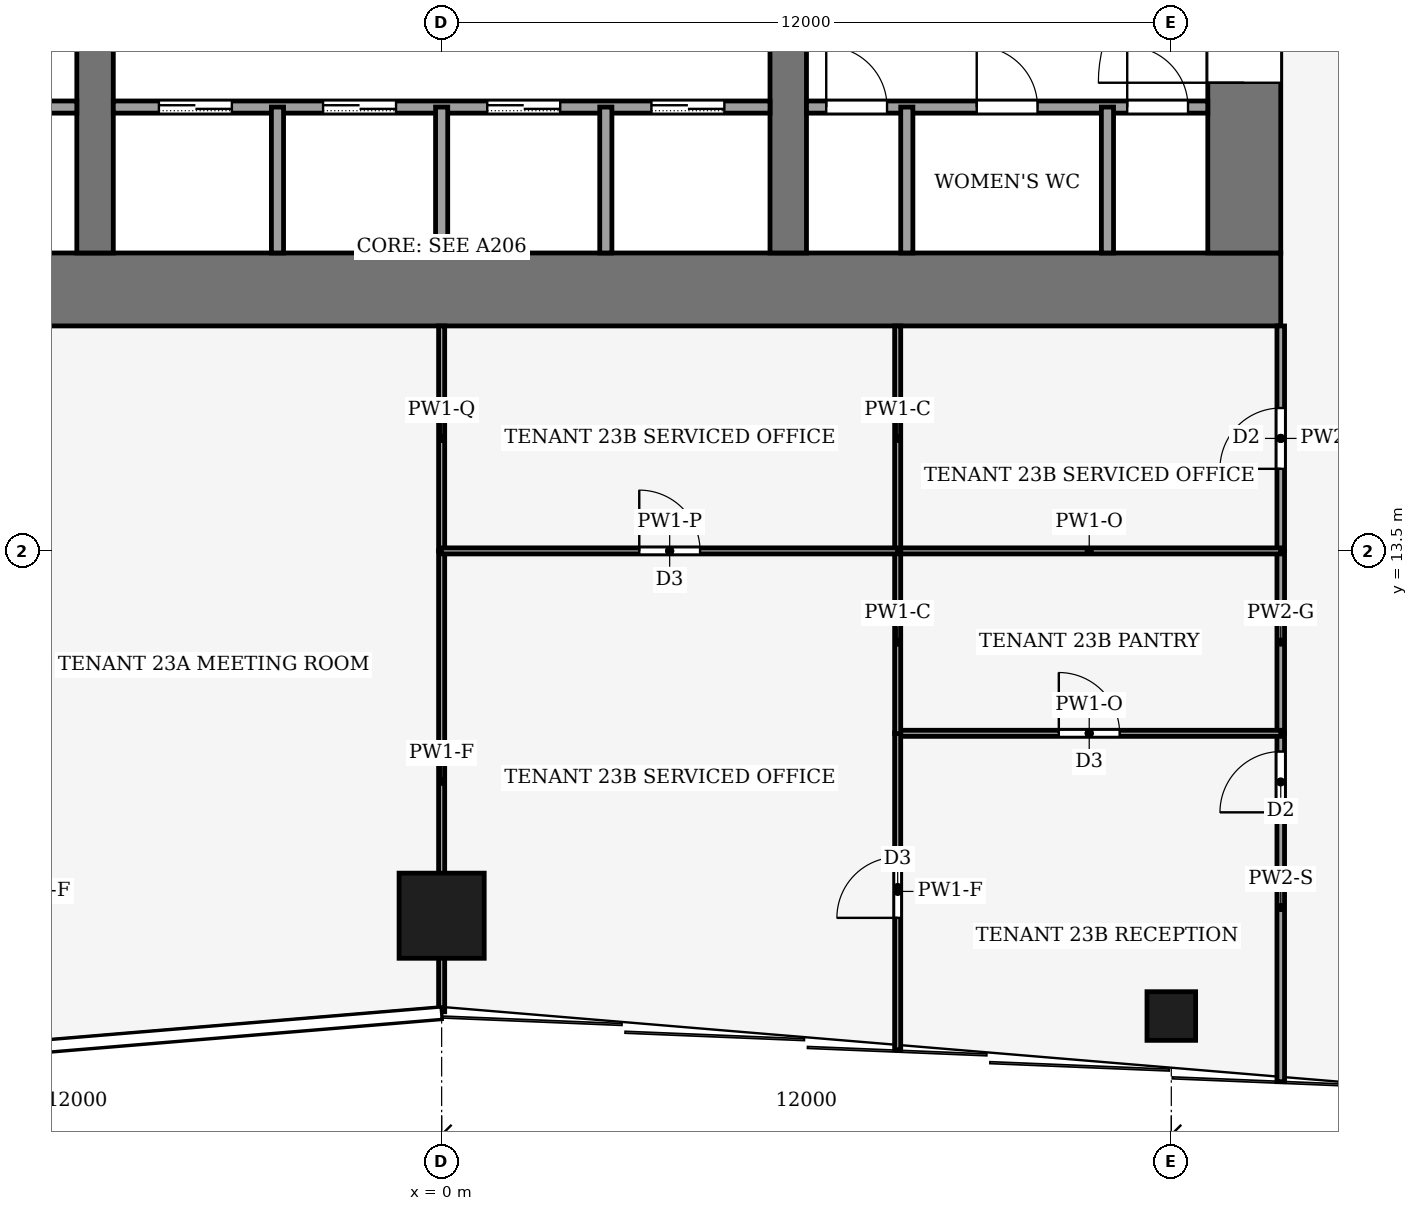
"""IFC4 building model, lengths in metres.
Left out: names, types, materials, properties, quantities, classifications, styles, units other than length and angle.
Written with IfcOpenShell. Run it as: python <this file> out.ifc"""

import sys

from ifc_helpers import new_model, si_unit, direction, frame, frame_2d, origin, origin_2d, place, context, subcontext, project, spatial, rectangle, hollow_rectangle, extrude, element, fill, save


model = new_model("IFC4")
c1 = context("Model", 3, precision=1e-05, world=origin(), true_north=direction((0.0, 1.0)))
c2 = subcontext(c1, "Body", "Model", "MODEL_VIEW")
j1 = project(units=[si_unit("LENGTHUNIT", "METRE"), si_unit("PLANEANGLEUNIT", "RADIAN")], contexts=[c1])
p1 = place(None, origin())
s1 = spatial("IfcSite", under=j1, at=p1, CompositionType="ELEMENT")
p2 = place(p1, origin())
s2 = spatial("IfcBuilding", under=s1, at=p2, CompositionType="ELEMENT")
p3 = place(p2, frame((0.0, 0.0, 102.0)))
s3 = spatial("IfcBuildingStorey", under=s2, at=p3, CompositionType="ELEMENT", Elevation=102.0)
p4 = place(p3, frame((-13.8, 17.8, -0.13), z_axis=(0.0, 0.0, 1.0), x_axis=(1.0, 0.0, 0.0)))
e1 = element("IfcWall", 1, at=p4, inside=s3, PredefinedType="SHEAR", context=c2, shape_type="SweptSolid", body=[
    extrude(rectangle(XDim=27.6, YDim=1.2, at=frame_2d((13.8, 0.0))), origin(), (0.0, 0.0, 1.0), 4.0),
])
p5 = place(p3, frame((13.2, 18.4, -0.13), z_axis=(0.0, 0.0, 1.0), x_axis=(0.0, 1.0, 0.0)))
e2 = element("IfcWall", 2, at=p5, inside=s3, PredefinedType="SHEAR", context=c2, shape_type="SweptSolid", body=[
    extrude(rectangle(XDim=19.2, YDim=1.2, at=frame_2d((9.6, 0.0))), origin(), (0.0, 0.0, 1.0), 4.0),
])
p6 = place(p5, frame((2.8, 0.0, 0.13)))
e3 = element("IfcOpeningElement", 3, at=p6, cuts=e2, PredefinedType="OPENING", context=c2, shape_type="SweptSolid", body=[
    extrude(rectangle(XDim=2.4, YDim=2.4, at=frame_2d((1.2, 1.2))), frame((0.0, 0.61, 0.0), z_axis=(0.0, -1.0, 0.0), x_axis=(1.0, 0.0, 0.0)), (0.0, 0.0, 1.0), 1.22),
])
p7 = place(p5, frame((13.3, 0.0, 0.13)))
e4 = element("IfcOpeningElement", 4, at=p7, cuts=e2, PredefinedType="OPENING", context=c2, shape_type="SweptSolid", body=[
    extrude(rectangle(XDim=2.4, YDim=2.4, at=frame_2d((1.2, 1.2))), frame((0.0, 0.61, 0.0), z_axis=(0.0, -1.0, 0.0), x_axis=(1.0, 0.0, 0.0)), (0.0, 0.0, 1.0), 1.22),
])
p8 = place(p3, frame((-5.7, 18.4, -0.13), z_axis=(0.0, 0.0, 1.0), x_axis=(0.0, 1.0, 0.0)))
e5 = element("IfcWall", 5, at=p8, inside=s3, PredefinedType="SHEAR", context=c2, shape_type="SweptSolid", body=[
    extrude(rectangle(XDim=19.2, YDim=0.6, at=frame_2d((9.6, 0.0))), origin(), (0.0, 0.0, 1.0), 4.0),
])
p9 = place(p8, frame((8.35, 0.0, 0.13)))
e6 = element("IfcOpeningElement", 6, at=p9, cuts=e5, PredefinedType="OPENING", context=c2, shape_type="SweptSolid", body=[
    extrude(rectangle(XDim=0.9, YDim=2.1, at=frame_2d((0.45, 1.05))), frame((0.0, 0.31, 0.0), z_axis=(0.0, -1.0, 0.0), x_axis=(1.0, 0.0, 0.0)), (0.0, 0.0, 1.0), 0.62),
])
p10 = place(p3, frame((5.7, 18.4, -0.13), z_axis=(0.0, 0.0, 1.0), x_axis=(0.0, 1.0, 0.0)))
e7 = element("IfcWall", 7, at=p10, inside=s3, PredefinedType="SHEAR", context=c2, shape_type="SweptSolid", body=[
    extrude(rectangle(XDim=19.2, YDim=0.6, at=frame_2d((9.6, 0.0))), origin(), (0.0, 0.0, 1.0), 4.0),
])
p11 = place(p10, frame((13.3, 0.0, 0.13)))
e8 = element("IfcOpeningElement", 8, at=p11, cuts=e7, PredefinedType="OPENING", context=c2, shape_type="SweptSolid", body=[
    extrude(rectangle(XDim=2.4, YDim=2.4, at=frame_2d((1.2, 1.2))), frame((0.0, 0.31, 0.0), z_axis=(0.0, -1.0, 0.0), x_axis=(1.0, 0.0, 0.0)), (0.0, 0.0, 1.0), 0.62),
])
p12 = place(p3, frame((0.0, 7.5, 0.0), z_axis=(0.0, 0.0, 1.0), x_axis=(1.0, 0.0, 0.0)))
e9 = element("IfcColumn", 9, at=p12, inside=s3, PredefinedType="COLUMN", context=c2, shape_type="SweptSolid", body=[
    extrude(hollow_rectangle(XDim=1.4, YDim=1.4, WallThickness=0.08, at=origin_2d()), origin(), (0.0, 0.0, 1.0), 4.0),
])
p13 = place(p3, frame((12.0, 5.85, 0.0), z_axis=(0.0, 0.0, 1.0), x_axis=(1.0, 0.0, 0.0)))
e10 = element("IfcColumn", 10, at=p13, inside=s3, PredefinedType="COLUMN", context=c2, shape_type="SweptSolid", body=[
    extrude(hollow_rectangle(XDim=0.8, YDim=0.8, WallThickness=0.04, at=origin_2d()), origin(), (0.0, 0.0, 1.0), 4.0),
])
p14 = place(p3, frame((-12.6, 20.8, 0.0), z_axis=(0.0, 0.0, 1.0), x_axis=(1.0, 0.0, 0.0)))
e11 = element("IfcWall", 11, at=p14, inside=s3, PredefinedType="PARTITIONING", context=c2, shape_type="SweptSolid", body=[
    extrude(rectangle(XDim=6.6, YDim=0.2, at=frame_2d((3.3, 0.0))), origin(), (0.0, 0.0, 1.0), 3.87),
])
p15 = place(p14, frame((2.8, 0.0, 0.0)))
e12 = element("IfcOpeningElement", 12, at=p15, cuts=e11, PredefinedType="OPENING", context=c2, shape_type="SweptSolid", body=[
    extrude(rectangle(XDim=1.0, YDim=2.1, at=frame_2d((0.5, 1.05))), frame((0.0, 0.11, 0.0), z_axis=(0.0, -1.0, 0.0), x_axis=(1.0, 0.0, 0.0)), (0.0, 0.0, 1.0), 0.22),
])
p16 = place(p3, frame((-5.4, 20.8, 0.0), z_axis=(0.0, 0.0, 1.0), x_axis=(1.0, 0.0, 0.0)))
e13 = element("IfcWall", 13, at=p16, inside=s3, PredefinedType="PARTITIONING", context=c2, shape_type="SweptSolid", body=[
    extrude(rectangle(XDim=10.8, YDim=0.2, at=frame_2d((5.4, 0.0))), origin(), (0.0, 0.0, 1.0), 3.87),
])
p17 = place(p16, frame((0.75, 0.0, 0.0)))
e14 = element("IfcOpeningElement", 14, at=p17, cuts=e13, PredefinedType="OPENING", context=c2, shape_type="SweptSolid", body=[
    extrude(rectangle(XDim=1.2, YDim=2.2, at=frame_2d((0.6, 1.1))), frame((0.0, 0.11, 0.0), z_axis=(0.0, -1.0, 0.0), x_axis=(1.0, 0.0, 0.0)), (0.0, 0.0, 1.0), 0.22),
])
p18 = place(p16, frame((3.45, 0.0, 0.0)))
e15 = element("IfcOpeningElement", 15, at=p18, cuts=e13, PredefinedType="OPENING", context=c2, shape_type="SweptSolid", body=[
    extrude(rectangle(XDim=1.2, YDim=2.2, at=frame_2d((0.6, 1.1))), frame((0.0, 0.11, 0.0), z_axis=(0.0, -1.0, 0.0), x_axis=(1.0, 0.0, 0.0)), (0.0, 0.0, 1.0), 0.22),
])
p19 = place(p16, frame((6.15, 0.0, 0.0)))
e16 = element("IfcOpeningElement", 16, at=p19, cuts=e13, PredefinedType="OPENING", context=c2, shape_type="SweptSolid", body=[
    extrude(rectangle(XDim=1.2, YDim=2.2, at=frame_2d((0.6, 1.1))), frame((0.0, 0.11, 0.0), z_axis=(0.0, -1.0, 0.0), x_axis=(1.0, 0.0, 0.0)), (0.0, 0.0, 1.0), 0.22),
])
p20 = place(p16, frame((8.85, 0.0, 0.0)))
e17 = element("IfcOpeningElement", 17, at=p20, cuts=e13, PredefinedType="OPENING", context=c2, shape_type="SweptSolid", body=[
    extrude(rectangle(XDim=1.2, YDim=2.2, at=frame_2d((0.6, 1.1))), frame((0.0, 0.11, 0.0), z_axis=(0.0, -1.0, 0.0), x_axis=(1.0, 0.0, 0.0)), (0.0, 0.0, 1.0), 0.22),
])
p21 = place(p3, frame((6.0, 20.8, 0.0), z_axis=(0.0, 0.0, 1.0), x_axis=(1.0, 0.0, 0.0)))
e18 = element("IfcWall", 18, at=p21, inside=s3, PredefinedType="PARTITIONING", context=c2, shape_type="SweptSolid", body=[
    extrude(rectangle(XDim=6.6, YDim=0.2, at=frame_2d((3.3, 0.0))), origin(), (0.0, 0.0, 1.0), 3.87),
])
p22 = place(p21, frame((0.325, 0.0, 0.0)))
e19 = element("IfcOpeningElement", 19, at=p22, cuts=e18, PredefinedType="OPENING", context=c2, shape_type="SweptSolid", body=[
    extrude(rectangle(XDim=1.0, YDim=2.1, at=frame_2d((0.5, 1.05))), frame((0.0, 0.11, 0.0), z_axis=(0.0, -1.0, 0.0), x_axis=(1.0, 0.0, 0.0)), (0.0, 0.0, 1.0), 0.22),
])
p23 = place(p21, frame((2.8, 0.0, 0.0)))
e20 = element("IfcOpeningElement", 20, at=p23, cuts=e18, PredefinedType="OPENING", context=c2, shape_type="SweptSolid", body=[
    extrude(rectangle(XDim=1.0, YDim=2.1, at=frame_2d((0.5, 1.05))), frame((0.0, 0.11, 0.0), z_axis=(0.0, -1.0, 0.0), x_axis=(1.0, 0.0, 0.0)), (0.0, 0.0, 1.0), 0.22),
])
p24 = place(p21, frame((5.275, 0.0, 0.0)))
e21 = element("IfcOpeningElement", 21, at=p24, cuts=e18, PredefinedType="OPENING", context=c2, shape_type="SweptSolid", body=[
    extrude(rectangle(XDim=1.0, YDim=2.1, at=frame_2d((0.5, 1.05))), frame((0.0, 0.11, 0.0), z_axis=(0.0, -1.0, 0.0), x_axis=(1.0, 0.0, 0.0)), (0.0, 0.0, 1.0), 0.22),
])
for number, where, z_axis, x_axis in (
    (22, (-2.7, 18.4, 0.0), (0.0, 0.0, 1.0), (0.0, 1.0, 0.0)),
    (23, (0.0, 18.4, 0.0), (0.0, 0.0, 1.0), (0.0, 1.0, 0.0)),
    (24, (2.7, 18.4, 0.0), (0.0, 0.0, 1.0), (0.0, 1.0, 0.0)),
    (25, (7.65, 18.4, 0.0), (0.0, 0.0, 1.0), (0.0, 1.0, 0.0)),
    (26, (10.95, 18.4, 0.0), (0.0, 0.0, 1.0), (0.0, 1.0, 0.0)),
):
    element("IfcWall", number, at=place(p3, frame(where, z_axis=z_axis, x_axis=x_axis)), inside=s3, PredefinedType="PARTITIONING", context=c2, shape_type="SweptSolid", body=[
        extrude(rectangle(XDim=2.4, YDim=0.2, at=frame_2d((1.2, 0.0))), origin(), (0.0, 0.0, 1.0), 3.87),
    ])
p25 = place(p3, frame((13.8, 4.77, 0.0), z_axis=(0.0, 0.0, 1.0), x_axis=(0.0, 1.0, 0.0)))
e27 = element("IfcWall", 27, at=p25, inside=s3, PredefinedType="PARTITIONING", context=c2, shape_type="SweptSolid", body=[
    extrude(rectangle(XDim=5.73, YDim=0.125, at=frame_2d((2.865, 0.0))), origin(), (0.0, 0.0, 1.0), 3.04),
])
p26 = place(p25, frame((4.43, 0.0, 0.0)))
e28 = element("IfcOpeningElement", 28, at=p26, cuts=e27, PredefinedType="OPENING", context=c2, shape_type="SweptSolid", body=[
    extrude(rectangle(XDim=1.0, YDim=2.1, at=frame_2d((0.5, 1.05))), frame((0.0, 0.073, 0.0), z_axis=(0.0, -1.0, 0.0), x_axis=(1.0, 0.0, 0.0)), (0.0, 0.0, 1.0), 0.145),
])
p27 = place(p3, frame((13.8, 13.5, 0.0), z_axis=(0.0, 0.0, 1.0), x_axis=(0.0, -1.0, 0.0)))
e29 = element("IfcWall", 29, at=p27, inside=s3, PredefinedType="PARTITIONING", context=c2, shape_type="SweptSolid", body=[
    extrude(rectangle(XDim=3.0, YDim=0.125, at=frame_2d((1.5, 0.0))), origin(), (0.0, 0.0, 1.0), 3.87),
])
p28 = place(p3, frame((13.8, 13.5, 0.0), z_axis=(0.0, 0.0, 1.0), x_axis=(0.0, 1.0, 0.0)))
e30 = element("IfcWall", 30, at=p28, inside=s3, PredefinedType="PARTITIONING", context=c2, shape_type="SweptSolid", body=[
    extrude(rectangle(XDim=3.7, YDim=0.125, at=frame_2d((1.85, 0.0))), origin(), (0.0, 0.0, 1.0), 3.14),
])
p29 = place(p28, frame((1.35, 0.0, 0.0)))
e31 = element("IfcOpeningElement", 31, at=p29, cuts=e30, PredefinedType="OPENING", context=c2, shape_type="SweptSolid", body=[
    extrude(rectangle(XDim=1.0, YDim=2.1, at=frame_2d((0.5, 1.05))), frame((0.0, 0.073, 0.0), z_axis=(0.0, -1.0, 0.0), x_axis=(1.0, 0.0, 0.0)), (0.0, 0.0, 1.0), 0.145),
])
p30 = place(p3, frame((0.0, 5.92, 0.0), z_axis=(0.0, 0.0, 1.0), x_axis=(0.0, 1.0, 0.0)))
e32 = element("IfcWall", 32, at=p30, inside=s3, PredefinedType="PARTITIONING", context=c2, shape_type="SweptSolid", body=[
    extrude(rectangle(XDim=7.58, YDim=0.1, at=frame_2d((3.79, 0.0))), origin(), (0.0, 0.0, 1.0), 3.04),
])
p31 = place(p3, frame((0.0, 13.5, 0.0), z_axis=(0.0, 0.0, 1.0), x_axis=(0.0, 1.0, 0.0)))
e33 = element("IfcWall", 33, at=p31, inside=s3, PredefinedType="PARTITIONING", context=c2, shape_type="SweptSolid", body=[
    extrude(rectangle(XDim=3.7, YDim=0.1, at=frame_2d((1.85, 0.0))), origin(), (0.0, 0.0, 1.0), 3.48),
])
p32 = place(p3, frame((7.5, 10.5, 0.0), z_axis=(0.0, 0.0, 1.0), x_axis=(1.0, 0.0, 0.0)))
e34 = element("IfcWall", 34, at=p32, inside=s3, PredefinedType="PARTITIONING", context=c2, shape_type="SweptSolid", body=[
    extrude(rectangle(XDim=6.3, YDim=0.1, at=frame_2d((3.15, 0.0))), origin(), (0.0, 0.0, 1.0), 3.39),
])
p33 = place(p32, frame((2.65, 0.0, 0.0)))
e35 = element("IfcOpeningElement", 35, at=p33, cuts=e34, PredefinedType="OPENING", context=c2, shape_type="SweptSolid", body=[
    extrude(rectangle(XDim=1.0, YDim=2.1, at=frame_2d((0.5, 1.05))), frame((0.0, 0.06, 0.0), z_axis=(0.0, -1.0, 0.0), x_axis=(1.0, 0.0, 0.0)), (0.0, 0.0, 1.0), 0.12),
])
p34 = place(p3, frame((7.5, 5.295, 0.0), z_axis=(0.0, 0.0, 1.0), x_axis=(0.0, 1.0, 0.0)))
e36 = element("IfcWall", 36, at=p34, inside=s3, PredefinedType="PARTITIONING", context=c2, shape_type="SweptSolid", body=[
    extrude(rectangle(XDim=5.209, YDim=0.1, at=frame_2d((2.604, 0.0))), origin(), (0.0, 0.0, 1.0), 3.04),
])
p35 = place(p34, frame((2.17, 0.0, 0.0)))
e37 = element("IfcOpeningElement", 37, at=p35, cuts=e36, PredefinedType="OPENING", context=c2, shape_type="SweptSolid", body=[
    extrude(rectangle(XDim=1.0, YDim=2.1, at=frame_2d((0.5, 1.05))), frame((0.0, 0.06, 0.0), z_axis=(0.0, -1.0, 0.0), x_axis=(1.0, 0.0, 0.0)), (0.0, 0.0, 1.0), 0.12),
])
p36 = place(p3, frame((13.8, 13.5, 0.0), z_axis=(0.0, 0.0, 1.0), x_axis=(-1.0, 0.0, 0.0)))
e38 = element("IfcWall", 38, at=p36, inside=s3, PredefinedType="PARTITIONING", context=c2, shape_type="SweptSolid", body=[
    extrude(rectangle(XDim=6.3, YDim=0.1, at=frame_2d((3.15, 0.0))), origin(), (0.0, 0.0, 1.0), 3.39),
])
p37 = place(p3, frame((7.5, 13.5, 0.0), z_axis=(0.0, 0.0, 1.0), x_axis=(0.0, -1.0, 0.0)))
e39 = element("IfcWall", 39, at=p37, inside=s3, PredefinedType="PARTITIONING", context=c2, shape_type="SweptSolid", body=[
    extrude(rectangle(XDim=3.004, YDim=0.1, at=frame_2d((1.502, 0.0))), origin(), (0.0, 0.0, 1.0), 3.87),
])
p38 = place(p3, frame((7.5, 17.2, 0.0), z_axis=(0.0, 0.0, 1.0), x_axis=(0.0, -1.0, 0.0)))
e40 = element("IfcWall", 40, at=p38, inside=s3, PredefinedType="PARTITIONING", context=c2, shape_type="SweptSolid", body=[
    extrude(rectangle(XDim=3.7, YDim=0.1, at=frame_2d((1.85, 0.0))), origin(), (0.0, 0.0, 1.0), 3.87),
])
p39 = place(p3, frame((0.0, 13.5, 0.0), z_axis=(0.0, 0.0, 1.0), x_axis=(1.0, 0.0, 0.0)))
e41 = element("IfcWall", 41, at=p39, inside=s3, PredefinedType="PARTITIONING", context=c2, shape_type="SweptSolid", body=[
    extrude(rectangle(XDim=7.5, YDim=0.1, at=frame_2d((3.75, 0.0))), origin(), (0.0, 0.0, 1.0), 3.44),
])
p40 = place(p39, frame((3.25, 0.0, 0.0)))
e42 = element("IfcOpeningElement", 42, at=p40, cuts=e41, PredefinedType="OPENING", context=c2, shape_type="SweptSolid", body=[
    extrude(rectangle(XDim=1.0, YDim=2.1, at=frame_2d((0.5, 1.05))), frame((0.0, 0.06, 0.0), z_axis=(0.0, -1.0, 0.0), x_axis=(1.0, 0.0, 0.0)), (0.0, 0.0, 1.0), 0.12),
])
p41 = place(p17, origin())
e43 = element("IfcDoor", 43, at=p41, inside=s3, OperationType="SLIDING_TO_LEFT", PredefinedType="DOOR", context=c2, shape_type="SweptSolid", body=[
    extrude(rectangle(XDim=1.2, YDim=2.2, at=frame_2d((0.6, 1.1))), frame((0.0, 0.025, 0.0), z_axis=(0.0, -1.0, 0.0), x_axis=(1.0, 0.0, 0.0)), (0.0, 0.0, 1.0), 0.05),
])
fill(e14, e43)
p42 = place(p18, origin())
e44 = element("IfcDoor", 44, at=p42, inside=s3, OperationType="SLIDING_TO_LEFT", PredefinedType="DOOR", context=c2, shape_type="SweptSolid", body=[
    extrude(rectangle(XDim=1.2, YDim=2.2, at=frame_2d((0.6, 1.1))), frame((0.0, 0.025, 0.0), z_axis=(0.0, -1.0, 0.0), x_axis=(1.0, 0.0, 0.0)), (0.0, 0.0, 1.0), 0.05),
])
fill(e15, e44)
p43 = place(p19, origin())
e45 = element("IfcDoor", 45, at=p43, inside=s3, OperationType="SLIDING_TO_LEFT", PredefinedType="DOOR", context=c2, shape_type="SweptSolid", body=[
    extrude(rectangle(XDim=1.2, YDim=2.2, at=frame_2d((0.6, 1.1))), frame((0.0, 0.025, 0.0), z_axis=(0.0, -1.0, 0.0), x_axis=(1.0, 0.0, 0.0)), (0.0, 0.0, 1.0), 0.05),
])
fill(e16, e45)
p44 = place(p20, origin())
e46 = element("IfcDoor", 46, at=p44, inside=s3, OperationType="SLIDING_TO_LEFT", PredefinedType="DOOR", context=c2, shape_type="SweptSolid", body=[
    extrude(rectangle(XDim=1.2, YDim=2.2, at=frame_2d((0.6, 1.1))), frame((0.0, 0.025, 0.0), z_axis=(0.0, -1.0, 0.0), x_axis=(1.0, 0.0, 0.0)), (0.0, 0.0, 1.0), 0.05),
])
fill(e17, e46)
p45 = place(p22, origin())
e47 = element("IfcDoor", 47, at=p45, inside=s3, OperationType="SINGLE_SWING_LEFT", PredefinedType="DOOR", context=c2, shape_type="SweptSolid", body=[
    extrude(rectangle(XDim=1.0, YDim=2.1, at=frame_2d((0.5, 1.05))), frame((0.0, 0.025, 0.0), z_axis=(0.0, -1.0, 0.0), x_axis=(1.0, 0.0, 0.0)), (0.0, 0.0, 1.0), 0.05),
])
fill(e19, e47)
p46 = place(p23, origin())
e48 = element("IfcDoor", 48, at=p46, inside=s3, OperationType="SINGLE_SWING_LEFT", PredefinedType="DOOR", context=c2, shape_type="SweptSolid", body=[
    extrude(rectangle(XDim=1.0, YDim=2.1, at=frame_2d((0.5, 1.05))), frame((0.0, 0.025, 0.0), z_axis=(0.0, -1.0, 0.0), x_axis=(1.0, 0.0, 0.0)), (0.0, 0.0, 1.0), 0.05),
])
fill(e20, e48)
p47 = place(p24, origin())
e49 = element("IfcDoor", 49, at=p47, inside=s3, OperationType="SINGLE_SWING_LEFT", PredefinedType="DOOR", context=c2, shape_type="SweptSolid", body=[
    extrude(rectangle(XDim=1.0, YDim=2.1, at=frame_2d((0.5, 1.05))), frame((0.0, 0.025, 0.0), z_axis=(0.0, -1.0, 0.0), x_axis=(1.0, 0.0, 0.0)), (0.0, 0.0, 1.0), 0.05),
])
fill(e21, e49)
p48 = place(p6, origin())
e50 = element("IfcDoor", 50, at=p48, inside=s3, OperationType="DOUBLE_DOOR_SINGLE_SWING", PredefinedType="DOOR", context=c2, shape_type="SweptSolid", body=[
    extrude(rectangle(XDim=2.4, YDim=2.4, at=frame_2d((1.2, 1.2))), frame((0.0, 0.025, 0.0), z_axis=(0.0, -1.0, 0.0), x_axis=(1.0, 0.0, 0.0)), (0.0, 0.0, 1.0), 0.05),
])
fill(e3, e50)
p49 = place(p26, origin())
e51 = element("IfcDoor", 51, at=p49, inside=s3, OperationType="SINGLE_SWING_RIGHT", PredefinedType="DOOR", context=c2, shape_type="SweptSolid", body=[
    extrude(rectangle(XDim=1.0, YDim=2.1, at=frame_2d((0.5, 1.05))), frame((0.0, 0.025, 0.0), z_axis=(0.0, -1.0, 0.0), x_axis=(1.0, 0.0, 0.0)), (0.0, 0.0, 1.0), 0.05),
])
fill(e28, e51)
p50 = place(p29, origin())
e52 = element("IfcDoor", 52, at=p50, inside=s3, OperationType="SINGLE_SWING_LEFT", PredefinedType="DOOR", context=c2, shape_type="SweptSolid", body=[
    extrude(rectangle(XDim=1.0, YDim=2.1, at=frame_2d((0.5, 1.05))), frame((0.0, 0.025, 0.0), z_axis=(0.0, -1.0, 0.0), x_axis=(1.0, 0.0, 0.0)), (0.0, 0.0, 1.0), 0.05),
])
fill(e31, e52)
p51 = place(p33, origin())
e53 = element("IfcDoor", 53, at=p51, inside=s3, OperationType="SINGLE_SWING_RIGHT", PredefinedType="DOOR", context=c2, shape_type="SweptSolid", body=[
    extrude(rectangle(XDim=1.0, YDim=2.1, at=frame_2d((0.5, 1.05))), frame((0.0, 0.025, 0.0), z_axis=(0.0, -1.0, 0.0), x_axis=(1.0, 0.0, 0.0)), (0.0, 0.0, 1.0), 0.05),
])
fill(e35, e53)
p52 = place(p35, origin())
e54 = element("IfcDoor", 54, at=p52, inside=s3, OperationType="SINGLE_SWING_RIGHT", PredefinedType="DOOR", context=c2, shape_type="SweptSolid", body=[
    extrude(rectangle(XDim=1.0, YDim=2.1, at=frame_2d((0.5, 1.05))), frame((0.0, 0.025, 0.0), z_axis=(0.0, -1.0, 0.0), x_axis=(1.0, 0.0, 0.0)), (0.0, 0.0, 1.0), 0.05),
])
fill(e37, e54)
p53 = place(p40, origin())
e55 = element("IfcDoor", 55, at=p53, inside=s3, OperationType="SINGLE_SWING_RIGHT", PredefinedType="DOOR", context=c2, shape_type="SweptSolid", body=[
    extrude(rectangle(XDim=1.0, YDim=2.1, at=frame_2d((0.5, 1.05))), frame((0.0, 0.025, 0.0), z_axis=(0.0, -1.0, 0.0), x_axis=(1.0, 0.0, 0.0)), (0.0, 0.0, 1.0), 0.05),
])
fill(e42, e55)
save(model, sys.argv[1])
